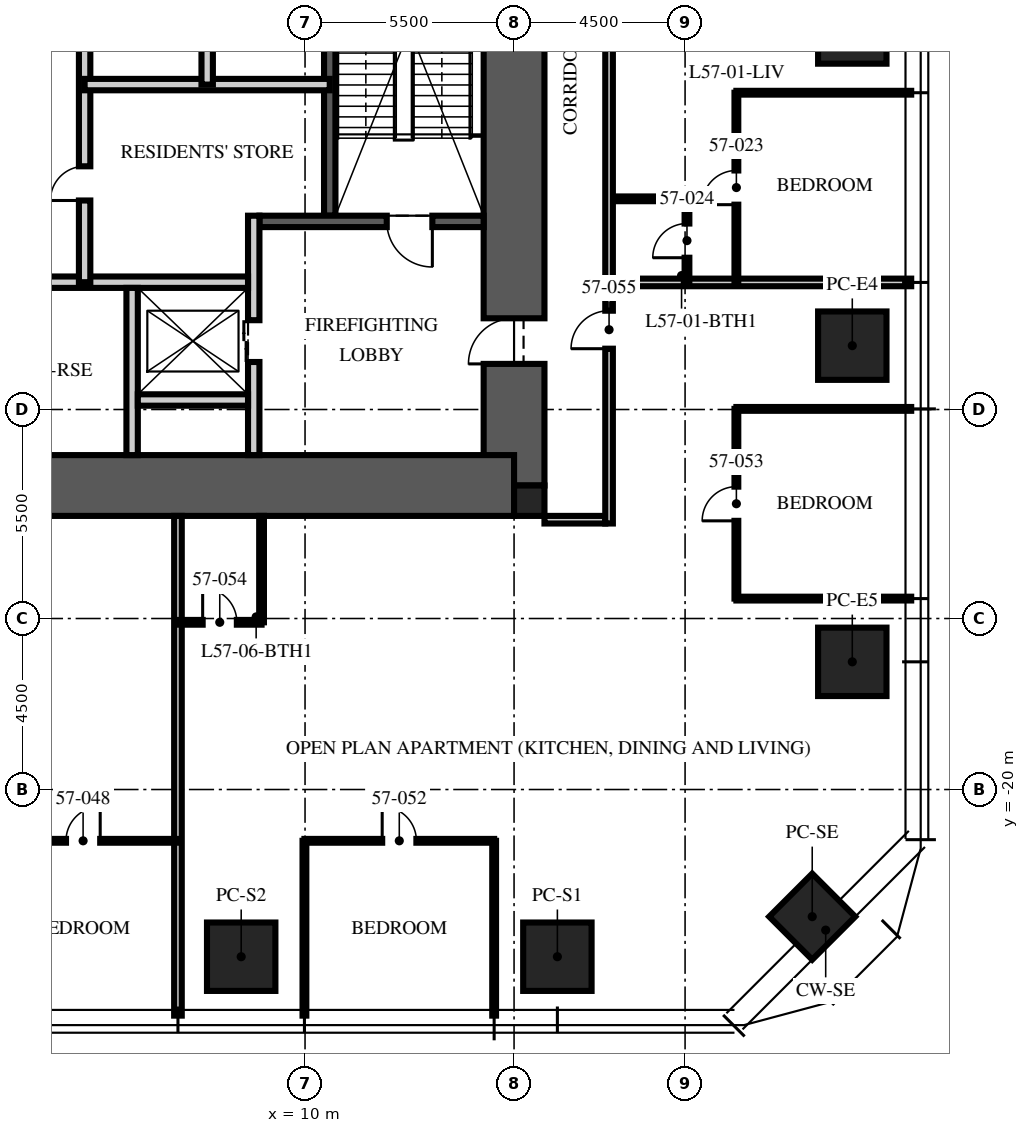
"""IFC4 building model, lengths in metres.
Left out: names, types, materials, properties, quantities, classifications, styles, units other than length and angle.
Written with IfcOpenShell. Run it as: python <this file> out.ifc"""

import sys

from ifc_helpers import new_model, si_unit, direction, frame, frame_2d, origin, origin_2d, place, context, subcontext, project, spatial, rectangle, extrude, element, fill, save


model = new_model("IFC4")
c1 = context("Model", 3, precision=1e-05, world=origin(), true_north=direction((0.0, 1.0)))
c2 = subcontext(c1, "Body", "Model", "MODEL_VIEW")
j1 = project(units=[si_unit("LENGTHUNIT", "METRE"), si_unit("PLANEANGLEUNIT", "RADIAN")], contexts=[c1])
p1 = place(None, origin())
s1 = spatial("IfcSite", under=j1, at=p1, CompositionType="ELEMENT")
p2 = place(p1, origin())
s2 = spatial("IfcBuilding", under=s1, at=p2, CompositionType="ELEMENT")
p3 = place(p2, frame((0.0, 0.0, 229.5)))
s3 = spatial("IfcBuildingStorey", under=s2, at=p3, CompositionType="ELEMENT", Elevation=229.5)
p4 = place(p3, frame((15.5, -12.0, -0.25), z_axis=(0.0, 0.0, 1.0), x_axis=(0.0, 1.0, 0.0)))
e1 = element("IfcWall", 1, at=p4, inside=s3, PredefinedType="SHEAR", context=c2, shape_type="SweptSolid", body=[
    extrude(rectangle(XDim=24.0, YDim=1.6, at=frame_2d((12.0, 0.0))), origin(), (0.0, 0.0, 1.0), 3.75),
])
p5 = place(p4, frame((3.2, 0.0, 0.25)))
e2 = element("IfcOpeningElement", 2, at=p5, cuts=e1, PredefinedType="OPENING", context=c2, shape_type="SweptSolid", body=[
    extrude(rectangle(XDim=1.2, YDim=2.1, at=frame_2d((0.6, 1.05))), frame((0.0, 0.81, 0.0), z_axis=(0.0, -1.0, 0.0), x_axis=(1.0, 0.0, 0.0)), (0.0, 0.0, 1.0), 1.62),
])
p6 = place(p4, frame((19.3, 0.0, 0.25)))
e3 = element("IfcOpeningElement", 3, at=p6, cuts=e1, PredefinedType="OPENING", context=c2, shape_type="SweptSolid", body=[
    extrude(rectangle(XDim=1.8, YDim=2.1, at=frame_2d((0.9, 1.05))), frame((0.0, 0.81, 0.0), z_axis=(0.0, -1.0, 0.0), x_axis=(1.0, 0.0, 0.0)), (0.0, 0.0, 1.0), 1.62),
])
p7 = place(p3, frame((-15.5, -12.0, -0.25), z_axis=(0.0, 0.0, 1.0), x_axis=(1.0, 0.0, 0.0)))
e4 = element("IfcWall", 4, at=p7, inside=s3, PredefinedType="SHEAR", context=c2, shape_type="SweptSolid", body=[
    extrude(rectangle(XDim=31.0, YDim=1.6, at=frame_2d((15.5, 0.0))), origin(), (0.0, 0.0, 1.0), 3.75),
])
p8 = place(p3, frame((15.9, -12.4, -0.25), z_axis=(0.0, 0.0, 1.0), x_axis=(1.0, 0.0, 0.0)))
e5 = element("IfcColumn", 5, at=p8, inside=s3, PredefinedType="COLUMN", context=c2, shape_type="SweptSolid", body=[
    extrude(rectangle(XDim=0.8, YDim=0.8, at=origin_2d()), origin(), (0.0, 0.0, 1.0), 3.75),
])
for number, where, z_axis, x_axis in (
    (6, (24.4, 0.0, 0.0), (0.0, 0.0, 1.0), (0.0, 1.0, 0.0)),
    (7, (24.4, -8.32, 0.0), (0.0, 0.0, 1.0), (0.0, 1.0, 0.0)),
    (8, (24.4, -16.64, 0.0), (0.0, 0.0, 1.0), (0.0, 1.0, 0.0)),
    (9, (16.64, -24.4, 0.0), (0.0, 0.0, 1.0), (1.0, 0.0, 0.0)),
    (10, (8.32, -24.4, 0.0), (0.0, 0.0, 1.0), (1.0, 0.0, 0.0)),
):
    element("IfcColumn", number, at=place(p3, frame(where, z_axis=z_axis, x_axis=x_axis)), inside=s3, PredefinedType="COLUMN", context=c2, shape_type="SweptSolid", body=[
        extrude(rectangle(XDim=1.8, YDim=1.8, at=origin_2d()), origin(), (0.0, 0.0, 1.0), 3.75),
    ])
p9 = place(p3, frame((23.346, -23.346, 0.0), z_axis=(0.0, 0.0, 1.0), x_axis=(0.707106781187, 0.707106781187, 0.0)))
e11 = element("IfcColumn", 11, at=p9, inside=s3, PredefinedType="COLUMN", context=c2, shape_type="SweptSolid", body=[
    extrude(rectangle(XDim=1.6, YDim=1.6, at=origin_2d()), origin(), (0.0, 0.0, 1.0), 3.75),
])
p10 = place(p3, frame((10.65, -4.9, 0.0), z_axis=(0.0, 0.0, 1.0), x_axis=(0.0, 1.0, 0.0)))
e12 = element("IfcWall", 12, at=p10, inside=s3, PredefinedType="SOLIDWALL", context=c2, shape_type="SweptSolid", body=[
    extrude(rectangle(XDim=10.1, YDim=0.3, at=frame_2d((5.05, 0.0))), origin(), (0.0, 0.0, 1.0), 3.5),
])
p11 = place(p3, frame((14.7, -5.05, 0.0), z_axis=(0.0, 0.0, 1.0), x_axis=(-1.0, 0.0, 0.0)))
e13 = element("IfcWall", 13, at=p11, inside=s3, PredefinedType="SOLIDWALL", context=c2, shape_type="SweptSolid", body=[
    extrude(rectangle(XDim=5.9, YDim=0.3, at=frame_2d((2.95, 0.0))), origin(), (0.0, 0.0, 1.0), 3.5),
])
p12 = place(p11, frame((1.35, 0.0, 0.0)))
e14 = element("IfcOpeningElement", 14, at=p12, cuts=e13, PredefinedType="OPENING", context=c2, shape_type="SweptSolid", body=[
    extrude(rectangle(XDim=1.2, YDim=2.1, at=frame_2d((0.6, 1.05))), frame((0.0, 0.16, 0.0), z_axis=(0.0, -1.0, 0.0), x_axis=(1.0, 0.0, 0.0)), (0.0, 0.0, 1.0), 0.32),
])
p13 = place(p3, frame((8.65, -11.2, 0.0), z_axis=(0.0, 0.0, 1.0), x_axis=(0.0, 1.0, 0.0)))
e15 = element("IfcWall", 15, at=p13, inside=s3, PredefinedType="PARTITIONING", context=c2, shape_type="SweptSolid", body=[
    extrude(rectangle(XDim=6.3, YDim=0.3, at=frame_2d((3.15, 0.0))), origin(), (0.0, 0.0, 1.0), 3.5),
])
p14 = place(p13, frame((2.45, 0.0, 0.0)))
e16 = element("IfcOpeningElement", 16, at=p14, cuts=e15, PredefinedType="OPENING", context=c2, shape_type="SweptSolid", body=[
    extrude(rectangle(XDim=1.1, YDim=2.1, at=frame_2d((0.55, 1.05))), frame((0.0, 0.16, 0.0), z_axis=(0.0, -1.0, 0.0), x_axis=(1.0, 0.0, 0.0)), (0.0, 0.0, 1.0), 0.32),
])
p15 = place(p3, frame((-8.5, -6.65, 0.0), z_axis=(0.0, 0.0, 1.0), x_axis=(1.0, 0.0, 0.0)))
e17 = element("IfcWall", 17, at=p15, inside=s3, PredefinedType="PARTITIONING", context=c2, shape_type="SweptSolid", body=[
    extrude(rectangle(XDim=17.0, YDim=0.3, at=frame_2d((8.5, 0.0))), origin(), (0.0, 0.0, 1.0), 3.5),
])
p16 = place(p15, frame((7.8, 0.0, 0.0)))
e18 = element("IfcOpeningElement", 18, at=p16, cuts=e17, PredefinedType="OPENING", context=c2, shape_type="SweptSolid", body=[
    extrude(rectangle(XDim=1.3, YDim=2.4, at=frame_2d((0.65, 1.2))), frame((0.0, 0.16, 0.0), z_axis=(0.0, -1.0, 0.0), x_axis=(1.0, 0.0, 0.0)), (0.0, 0.0, 1.0), 0.32),
])
p17 = place(p15, frame((5.65, 0.0, 0.0)))
e19 = element("IfcOpeningElement", 19, at=p17, cuts=e17, PredefinedType="OPENING", context=c2, shape_type="SweptSolid", body=[
    extrude(rectangle(XDim=0.9, YDim=2.1, at=frame_2d((0.45, 1.05))), frame((0.0, 0.16, 0.0), z_axis=(0.0, -1.0, 0.0), x_axis=(1.0, 0.0, 0.0)), (0.0, 0.0, 1.0), 0.32),
])
p18 = place(p15, frame((10.4, 0.0, 0.0)))
e20 = element("IfcOpeningElement", 20, at=p18, cuts=e17, PredefinedType="OPENING", context=c2, shape_type="SweptSolid", body=[
    extrude(rectangle(XDim=0.9, YDim=2.1, at=frame_2d((0.45, 1.05))), frame((0.0, 0.16, 0.0), z_axis=(0.0, -1.0, 0.0), x_axis=(1.0, 0.0, 0.0)), (0.0, 0.0, 1.0), 0.32),
])
p19 = place(p3, frame((5.45, -11.2, 0.0), z_axis=(0.0, 0.0, 1.0), x_axis=(0.0, 1.0, 0.0)))
e21 = element("IfcWall", 21, at=p19, inside=s3, PredefinedType="PARTITIONING", context=c2, shape_type="SweptSolid", body=[
    extrude(rectangle(XDim=4.4, YDim=0.3, at=frame_2d((2.2, 0.0))), origin(), (0.0, 0.0, 1.0), 3.5),
])
p20 = place(p3, frame((5.6, -9.75, 0.0), z_axis=(0.0, 0.0, 1.0), x_axis=(1.0, 0.0, 0.0)))
e22 = element("IfcWall", 22, at=p20, inside=s3, PredefinedType="PARTITIONING", context=c2, shape_type="SweptSolid", body=[
    extrude(rectangle(XDim=2.9, YDim=0.3, at=frame_2d((1.45, 0.0))), origin(), (0.0, 0.0, 1.0), 3.5),
])
p21 = place(p3, frame((4.2, -6.65, 0.0), z_axis=(0.0, 0.0, 1.0), x_axis=(0.0, 1.0, 0.0)))
e23 = element("IfcWall", 23, at=p21, inside=s3, PredefinedType="PARTITIONING", context=c2, shape_type="SweptSolid", body=[
    extrude(rectangle(XDim=10.25, YDim=0.3, at=frame_2d((5.125, 0.0))), origin(), (0.0, 0.0, 1.0), 3.5),
])
p22 = place(p21, frame((2.15, 0.0, 0.0)))
e24 = element("IfcOpeningElement", 24, at=p22, cuts=e23, PredefinedType="OPENING", context=c2, shape_type="SweptSolid", body=[
    extrude(rectangle(XDim=0.9, YDim=2.1, at=frame_2d((0.45, 1.05))), frame((0.0, 0.16, 0.0), z_axis=(0.0, -1.0, 0.0), x_axis=(1.0, 0.0, 0.0)), (0.0, 0.0, 1.0), 0.32),
])
p23 = place(p21, frame((7.275, 0.0, 0.0)))
e25 = element("IfcOpeningElement", 25, at=p23, cuts=e23, PredefinedType="OPENING", context=c2, shape_type="SweptSolid", body=[
    extrude(rectangle(XDim=0.9, YDim=2.1, at=frame_2d((0.45, 1.05))), frame((0.0, 0.16, 0.0), z_axis=(0.0, -1.0, 0.0), x_axis=(1.0, 0.0, 0.0)), (0.0, 0.0, 1.0), 0.32),
])
p24 = place(p3, frame((10.65, -1.45, 0.0), z_axis=(0.0, 0.0, 1.0), x_axis=(-1.0, 0.0, 0.0)))
e26 = element("IfcWall", 26, at=p24, inside=s3, PredefinedType="PARTITIONING", context=c2, shape_type="SweptSolid", body=[
    extrude(rectangle(XDim=6.45, YDim=0.3, at=frame_2d((3.225, 0.0))), origin(), (0.0, 0.0, 1.0), 3.5),
])
p25 = place(p3, frame((7.425, -1.45, 0.0), z_axis=(0.0, 0.0, 1.0), x_axis=(0.0, 1.0, 0.0)))
e27 = element("IfcWall", 27, at=p25, inside=s3, PredefinedType="PARTITIONING", context=c2, shape_type="SweptSolid", body=[
    extrude(rectangle(XDim=5.05, YDim=0.3, at=frame_2d((2.525, 0.0))), origin(), (0.0, 0.0, 1.0), 3.5),
])
p26 = place(p3, frame((16.3, -12.9, 0.0), z_axis=(0.0, 0.0, 1.0), x_axis=(1.0, 0.0, 0.0)))
e28 = element("IfcWall", 28, at=p26, inside=s3, PredefinedType="PARTITIONING", context=c2, shape_type="SweptSolid", body=[
    extrude(rectangle(XDim=1.6, YDim=0.2, at=frame_2d((0.8, 0.0))), origin(), (0.0, 0.0, 1.0), 2.3),
])
p27 = place(p3, frame((18.1, -6.656, 0.0), z_axis=(0.0, 0.0, 1.0), x_axis=(1.0, 0.0, 0.0)))
e29 = element("IfcWall", 29, at=p27, inside=s3, PredefinedType="PARTITIONING", context=c2, shape_type="SweptSolid", body=[
    extrude(rectangle(XDim=7.85, YDim=0.2, at=frame_2d((3.925, 0.0))), origin(), (0.0, 0.0, 1.0), 2.91),
])
p28 = place(p3, frame((21.35, -1.664, 0.0), z_axis=(0.0, 0.0, 1.0), x_axis=(1.0, 0.0, 0.0)))
e30 = element("IfcWall", 30, at=p28, inside=s3, PredefinedType="PARTITIONING", context=c2, shape_type="SweptSolid", body=[
    extrude(rectangle(XDim=4.6, YDim=0.1, at=frame_2d((2.3, 0.0))), origin(), (0.0, 0.0, 1.0), 2.91),
])
p29 = place(p3, frame((6.656, -12.8, 0.0), z_axis=(0.0, 0.0, 1.0), x_axis=(0.0, -1.0, 0.0)))
e31 = element("IfcWall", 31, at=p29, inside=s3, PredefinedType="PARTITIONING", context=c2, shape_type="SweptSolid", body=[
    extrude(rectangle(XDim=13.15, YDim=0.2, at=frame_2d((6.575, 0.0))), origin(), (0.0, 0.0, 1.0), 2.91),
])
for number, where, z_axis, x_axis in (
    (32, (9.984, -21.35, 0.0), (0.0, 0.0, 1.0), (0.0, -1.0, 0.0)),
    (33, (14.976, -21.35, 0.0), (0.0, 0.0, 1.0), (0.0, -1.0, 0.0)),
    (34, (21.35, -14.976, 0.0), (0.0, 0.0, 1.0), (1.0, 0.0, 0.0)),
    (35, (21.35, -9.984, 0.0), (0.0, 0.0, 1.0), (1.0, 0.0, 0.0)),
):
    element("IfcWall", number, at=place(p3, frame(where, z_axis=z_axis, x_axis=x_axis)), inside=s3, PredefinedType="PARTITIONING", context=c2, shape_type="SweptSolid", body=[
        extrude(rectangle(XDim=4.6, YDim=0.1, at=frame_2d((2.3, 0.0))), origin(), (0.0, 0.0, 1.0), 2.91),
    ])
p30 = place(p3, frame((21.35, -6.656, 0.0), z_axis=(0.0, 0.0, 1.0), x_axis=(0.0, 1.0, 0.0)))
e36 = element("IfcWall", 36, at=p30, inside=s3, PredefinedType="PARTITIONING", context=c2, shape_type="SweptSolid", body=[
    extrude(rectangle(XDim=4.992, YDim=0.1, at=frame_2d((2.496, 0.0))), origin(), (0.0, 0.0, 1.0), 2.81),
])
p31 = place(p30, frame((2.046, 0.0, 0.0)))
e37 = element("IfcOpeningElement", 37, at=p31, cuts=e36, PredefinedType="OPENING", context=c2, shape_type="SweptSolid", body=[
    extrude(rectangle(XDim=0.9, YDim=2.1, at=frame_2d((0.45, 1.05))), frame((0.0, 0.06, 0.0), z_axis=(0.0, -1.0, 0.0), x_axis=(1.0, 0.0, 0.0)), (0.0, 0.0, 1.0), 0.12),
])
p32 = place(p3, frame((20.05, -6.656, 0.0), z_axis=(0.0, 0.0, 1.0), x_axis=(0.0, 1.0, 0.0)))
e38 = element("IfcWall", 38, at=p32, inside=s3, PredefinedType="PARTITIONING", context=c2, shape_type="SweptSolid", body=[
    extrude(rectangle(XDim=2.2, YDim=0.125, at=frame_2d((1.1, 0.0))), origin(), (0.0, 0.0, 1.0), 3.5),
])
p33 = place(p32, frame((0.65, 0.0, 0.0)))
e39 = element("IfcOpeningElement", 39, at=p33, cuts=e38, PredefinedType="OPENING", context=c2, shape_type="SweptSolid", body=[
    extrude(rectangle(XDim=0.9, YDim=2.1, at=frame_2d((0.45, 1.05))), frame((0.0, 0.073, 0.0), z_axis=(0.0, -1.0, 0.0), x_axis=(1.0, 0.0, 0.0)), (0.0, 0.0, 1.0), 0.145),
])
p34 = place(p3, frame((18.1, -4.456, 0.0), z_axis=(0.0, 0.0, 1.0), x_axis=(1.0, 0.0, 0.0)))
e40 = element("IfcWall", 40, at=p34, inside=s3, PredefinedType="PARTITIONING", context=c2, shape_type="SweptSolid", body=[
    extrude(rectangle(XDim=1.95, YDim=0.125, at=frame_2d((0.975, 0.0))), origin(), (0.0, 0.0, 1.0), 3.5),
])
p35 = place(p3, frame((1.664, -21.35, 0.0), z_axis=(0.0, 0.0, 1.0), x_axis=(1.0, 0.0, 0.0)))
e41 = element("IfcWall", 41, at=p35, inside=s3, PredefinedType="PARTITIONING", context=c2, shape_type="SweptSolid", body=[
    extrude(rectangle(XDim=4.992, YDim=0.1, at=frame_2d((2.496, 0.0))), origin(), (0.0, 0.0, 1.0), 2.81),
])
p36 = place(p35, frame((2.046, 0.0, 0.0)))
e42 = element("IfcOpeningElement", 42, at=p36, cuts=e41, PredefinedType="OPENING", context=c2, shape_type="SweptSolid", body=[
    extrude(rectangle(XDim=0.9, YDim=2.1, at=frame_2d((0.45, 1.05))), frame((0.0, 0.06, 0.0), z_axis=(0.0, -1.0, 0.0), x_axis=(1.0, 0.0, 0.0)), (0.0, 0.0, 1.0), 0.12),
])
p37 = place(p3, frame((9.984, -21.35, 0.0), z_axis=(0.0, 0.0, 1.0), x_axis=(1.0, 0.0, 0.0)))
e43 = element("IfcWall", 43, at=p37, inside=s3, PredefinedType="PARTITIONING", context=c2, shape_type="SweptSolid", body=[
    extrude(rectangle(XDim=4.992, YDim=0.1, at=frame_2d((2.496, 0.0))), origin(), (0.0, 0.0, 1.0), 2.81),
])
p38 = place(p37, frame((2.046, 0.0, 0.0)))
e44 = element("IfcOpeningElement", 44, at=p38, cuts=e43, PredefinedType="OPENING", context=c2, shape_type="SweptSolid", body=[
    extrude(rectangle(XDim=0.9, YDim=2.1, at=frame_2d((0.45, 1.05))), frame((0.0, 0.06, 0.0), z_axis=(0.0, -1.0, 0.0), x_axis=(1.0, 0.0, 0.0)), (0.0, 0.0, 1.0), 0.12),
])
p39 = place(p3, frame((21.35, -14.976, 0.0), z_axis=(0.0, 0.0, 1.0), x_axis=(0.0, 1.0, 0.0)))
e45 = element("IfcWall", 45, at=p39, inside=s3, PredefinedType="PARTITIONING", context=c2, shape_type="SweptSolid", body=[
    extrude(rectangle(XDim=4.992, YDim=0.1, at=frame_2d((2.496, 0.0))), origin(), (0.0, 0.0, 1.0), 2.81),
])
p40 = place(p39, frame((2.046, 0.0, 0.0)))
e46 = element("IfcOpeningElement", 46, at=p40, cuts=e45, PredefinedType="OPENING", context=c2, shape_type="SweptSolid", body=[
    extrude(rectangle(XDim=0.9, YDim=2.1, at=frame_2d((0.45, 1.05))), frame((0.0, 0.06, 0.0), z_axis=(0.0, -1.0, 0.0), x_axis=(1.0, 0.0, 0.0)), (0.0, 0.0, 1.0), 0.12),
])
p41 = place(p3, frame((6.656, -15.6, 0.0), z_axis=(0.0, 0.0, 1.0), x_axis=(1.0, 0.0, 0.0)))
e47 = element("IfcWall", 47, at=p41, inside=s3, PredefinedType="PARTITIONING", context=c2, shape_type="SweptSolid", body=[
    extrude(rectangle(XDim=2.2, YDim=0.125, at=frame_2d((1.1, 0.0))), origin(), (0.0, 0.0, 1.0), 2.6),
])
p42 = place(p41, frame((0.65, 0.0, 0.0)))
e48 = element("IfcOpeningElement", 48, at=p42, cuts=e47, PredefinedType="OPENING", context=c2, shape_type="SweptSolid", body=[
    extrude(rectangle(XDim=0.9, YDim=2.1, at=frame_2d((0.45, 1.05))), frame((0.0, 0.073, 0.0), z_axis=(0.0, -1.0, 0.0), x_axis=(1.0, 0.0, 0.0)), (0.0, 0.0, 1.0), 0.145),
])
p43 = place(p3, frame((8.856, -12.8, 0.0), z_axis=(0.0, 0.0, 1.0), x_axis=(0.0, -1.0, 0.0)))
e49 = element("IfcWall", 49, at=p43, inside=s3, PredefinedType="PARTITIONING", context=c2, shape_type="SweptSolid", body=[
    extrude(rectangle(XDim=2.8, YDim=0.125, at=frame_2d((1.4, 0.0))), origin(), (0.0, 0.0, 1.0), 3.5),
])
p44 = place(p3, frame((18.0, -13.0, 0.0), z_axis=(0.0, 0.0, 1.0), x_axis=(0.0, 1.0, 0.0)))
e50 = element("IfcWall", 50, at=p44, inside=s3, PredefinedType="PARTITIONING", context=c2, shape_type="SweptSolid", body=[
    extrude(rectangle(XDim=26.0, YDim=0.2, at=frame_2d((13.0, 0.0))), origin(), (0.0, 0.0, 1.0), 2.6),
])
p45 = place(p44, frame((13.114, 0.0, 0.0)))
e51 = element("IfcOpeningElement", 51, at=p45, cuts=e50, PredefinedType="OPENING", context=c2, shape_type="SweptSolid", body=[
    extrude(rectangle(XDim=1.0, YDim=2.2, at=frame_2d((0.5, 1.1))), frame((0.0, 0.11, 0.0), z_axis=(0.0, -1.0, 0.0), x_axis=(1.0, 0.0, 0.0)), (0.0, 0.0, 1.0), 0.22),
])
p46 = place(p44, frame((23.684, 0.0, 0.0)))
e52 = element("IfcOpeningElement", 52, at=p46, cuts=e50, PredefinedType="OPENING", context=c2, shape_type="SweptSolid", body=[
    extrude(rectangle(XDim=1.0, YDim=2.2, at=frame_2d((0.5, 1.1))), frame((0.0, 0.11, 0.0), z_axis=(0.0, -1.0, 0.0), x_axis=(1.0, 0.0, 0.0)), (0.0, 0.0, 1.0), 0.22),
])
p47 = place(p44, frame((4.6, 0.0, 0.0)))
e53 = element("IfcOpeningElement", 53, at=p47, cuts=e50, PredefinedType="OPENING", context=c2, shape_type="SweptSolid", body=[
    extrude(rectangle(XDim=1.0, YDim=2.2, at=frame_2d((0.5, 1.1))), frame((0.0, 0.11, 0.0), z_axis=(0.0, -1.0, 0.0), x_axis=(1.0, 0.0, 0.0)), (0.0, 0.0, 1.0), 0.22),
])
p48 = place(p12, origin())
e54 = element("IfcDoor", 54, at=p48, inside=s3, OperationType="SINGLE_SWING_LEFT", PredefinedType="DOOR", context=c2, shape_type="SweptSolid", body=[
    extrude(rectangle(XDim=1.2, YDim=2.1, at=frame_2d((0.6, 1.05))), frame((0.0, 0.025, 0.0), z_axis=(0.0, -1.0, 0.0), x_axis=(1.0, 0.0, 0.0)), (0.0, 0.0, 1.0), 0.05),
])
fill(e14, e54)
p49 = place(p5, origin())
e55 = element("IfcDoor", 55, at=p49, inside=s3, OperationType="SINGLE_SWING_LEFT", PredefinedType="DOOR", context=c2, shape_type="SweptSolid", body=[
    extrude(rectangle(XDim=1.2, YDim=2.1, at=frame_2d((0.6, 1.05))), frame((0.0, 0.025, 0.0), z_axis=(0.0, -1.0, 0.0), x_axis=(1.0, 0.0, 0.0)), (0.0, 0.0, 1.0), 0.05),
])
fill(e2, e55)
p50 = place(p14, origin())
e56 = element("IfcDoor", 56, at=p50, inside=s3, OperationType="DOUBLE_DOOR_SLIDING", PredefinedType="DOOR", context=c2, shape_type="SweptSolid", body=[
    extrude(rectangle(XDim=1.1, YDim=2.1, at=frame_2d((0.55, 1.05))), frame((0.0, 0.025, 0.0), z_axis=(0.0, -1.0, 0.0), x_axis=(1.0, 0.0, 0.0)), (0.0, 0.0, 1.0), 0.05),
])
fill(e16, e56)
p51 = place(p22, origin())
e57 = element("IfcDoor", 57, at=p51, inside=s3, OperationType="SINGLE_SWING_LEFT", PredefinedType="DOOR", context=c2, shape_type="SweptSolid", body=[
    extrude(rectangle(XDim=0.9, YDim=2.1, at=frame_2d((0.45, 1.05))), frame((0.0, 0.025, 0.0), z_axis=(0.0, -1.0, 0.0), x_axis=(1.0, 0.0, 0.0)), (0.0, 0.0, 1.0), 0.05),
])
fill(e24, e57)
p52 = place(p31, origin())
e58 = element("IfcDoor", 58, at=p52, inside=s3, OperationType="SINGLE_SWING_LEFT", PredefinedType="DOOR", context=c2, shape_type="SweptSolid", body=[
    extrude(rectangle(XDim=0.9, YDim=2.1, at=frame_2d((0.45, 1.05))), frame((0.0, 0.025, 0.0), z_axis=(0.0, -1.0, 0.0), x_axis=(1.0, 0.0, 0.0)), (0.0, 0.0, 1.0), 0.05),
])
fill(e37, e58)
p53 = place(p33, origin())
e59 = element("IfcDoor", 59, at=p53, inside=s3, OperationType="SINGLE_SWING_LEFT", PredefinedType="DOOR", context=c2, shape_type="SweptSolid", body=[
    extrude(rectangle(XDim=0.9, YDim=2.1, at=frame_2d((0.45, 1.05))), frame((0.0, 0.025, 0.0), z_axis=(0.0, -1.0, 0.0), x_axis=(1.0, 0.0, 0.0)), (0.0, 0.0, 1.0), 0.05),
])
fill(e39, e59)
p54 = place(p36, origin())
e60 = element("IfcDoor", 60, at=p54, inside=s3, OperationType="SINGLE_SWING_RIGHT", PredefinedType="DOOR", context=c2, shape_type="SweptSolid", body=[
    extrude(rectangle(XDim=0.9, YDim=2.1, at=frame_2d((0.45, 1.05))), frame((0.0, 0.025, 0.0), z_axis=(0.0, -1.0, 0.0), x_axis=(1.0, 0.0, 0.0)), (0.0, 0.0, 1.0), 0.05),
])
fill(e42, e60)
p55 = place(p38, origin())
e61 = element("IfcDoor", 61, at=p55, inside=s3, OperationType="SINGLE_SWING_LEFT", PredefinedType="DOOR", context=c2, shape_type="SweptSolid", body=[
    extrude(rectangle(XDim=0.9, YDim=2.1, at=frame_2d((0.45, 1.05))), frame((0.0, 0.025, 0.0), z_axis=(0.0, -1.0, 0.0), x_axis=(1.0, 0.0, 0.0)), (0.0, 0.0, 1.0), 0.05),
])
fill(e44, e61)
p56 = place(p40, origin())
e62 = element("IfcDoor", 62, at=p56, inside=s3, OperationType="SINGLE_SWING_LEFT", PredefinedType="DOOR", context=c2, shape_type="SweptSolid", body=[
    extrude(rectangle(XDim=0.9, YDim=2.1, at=frame_2d((0.45, 1.05))), frame((0.0, 0.025, 0.0), z_axis=(0.0, -1.0, 0.0), x_axis=(1.0, 0.0, 0.0)), (0.0, 0.0, 1.0), 0.05),
])
fill(e46, e62)
p57 = place(p42, origin())
e63 = element("IfcDoor", 63, at=p57, inside=s3, OperationType="SINGLE_SWING_LEFT", PredefinedType="DOOR", context=c2, shape_type="SweptSolid", body=[
    extrude(rectangle(XDim=0.9, YDim=2.1, at=frame_2d((0.45, 1.05))), frame((0.0, 0.025, 0.0), z_axis=(0.0, -1.0, 0.0), x_axis=(1.0, 0.0, 0.0)), (0.0, 0.0, 1.0), 0.05),
])
fill(e48, e63)
p58 = place(p47, origin())
e64 = element("IfcDoor", 64, at=p58, inside=s3, OperationType="SINGLE_SWING_LEFT", PredefinedType="DOOR", context=c2, shape_type="SweptSolid", body=[
    extrude(rectangle(XDim=1.0, YDim=2.2, at=frame_2d((0.5, 1.1))), frame((0.0, 0.025, 0.0), z_axis=(0.0, -1.0, 0.0), x_axis=(1.0, 0.0, 0.0)), (0.0, 0.0, 1.0), 0.05),
])
fill(e53, e64)
save(model, sys.argv[1])
